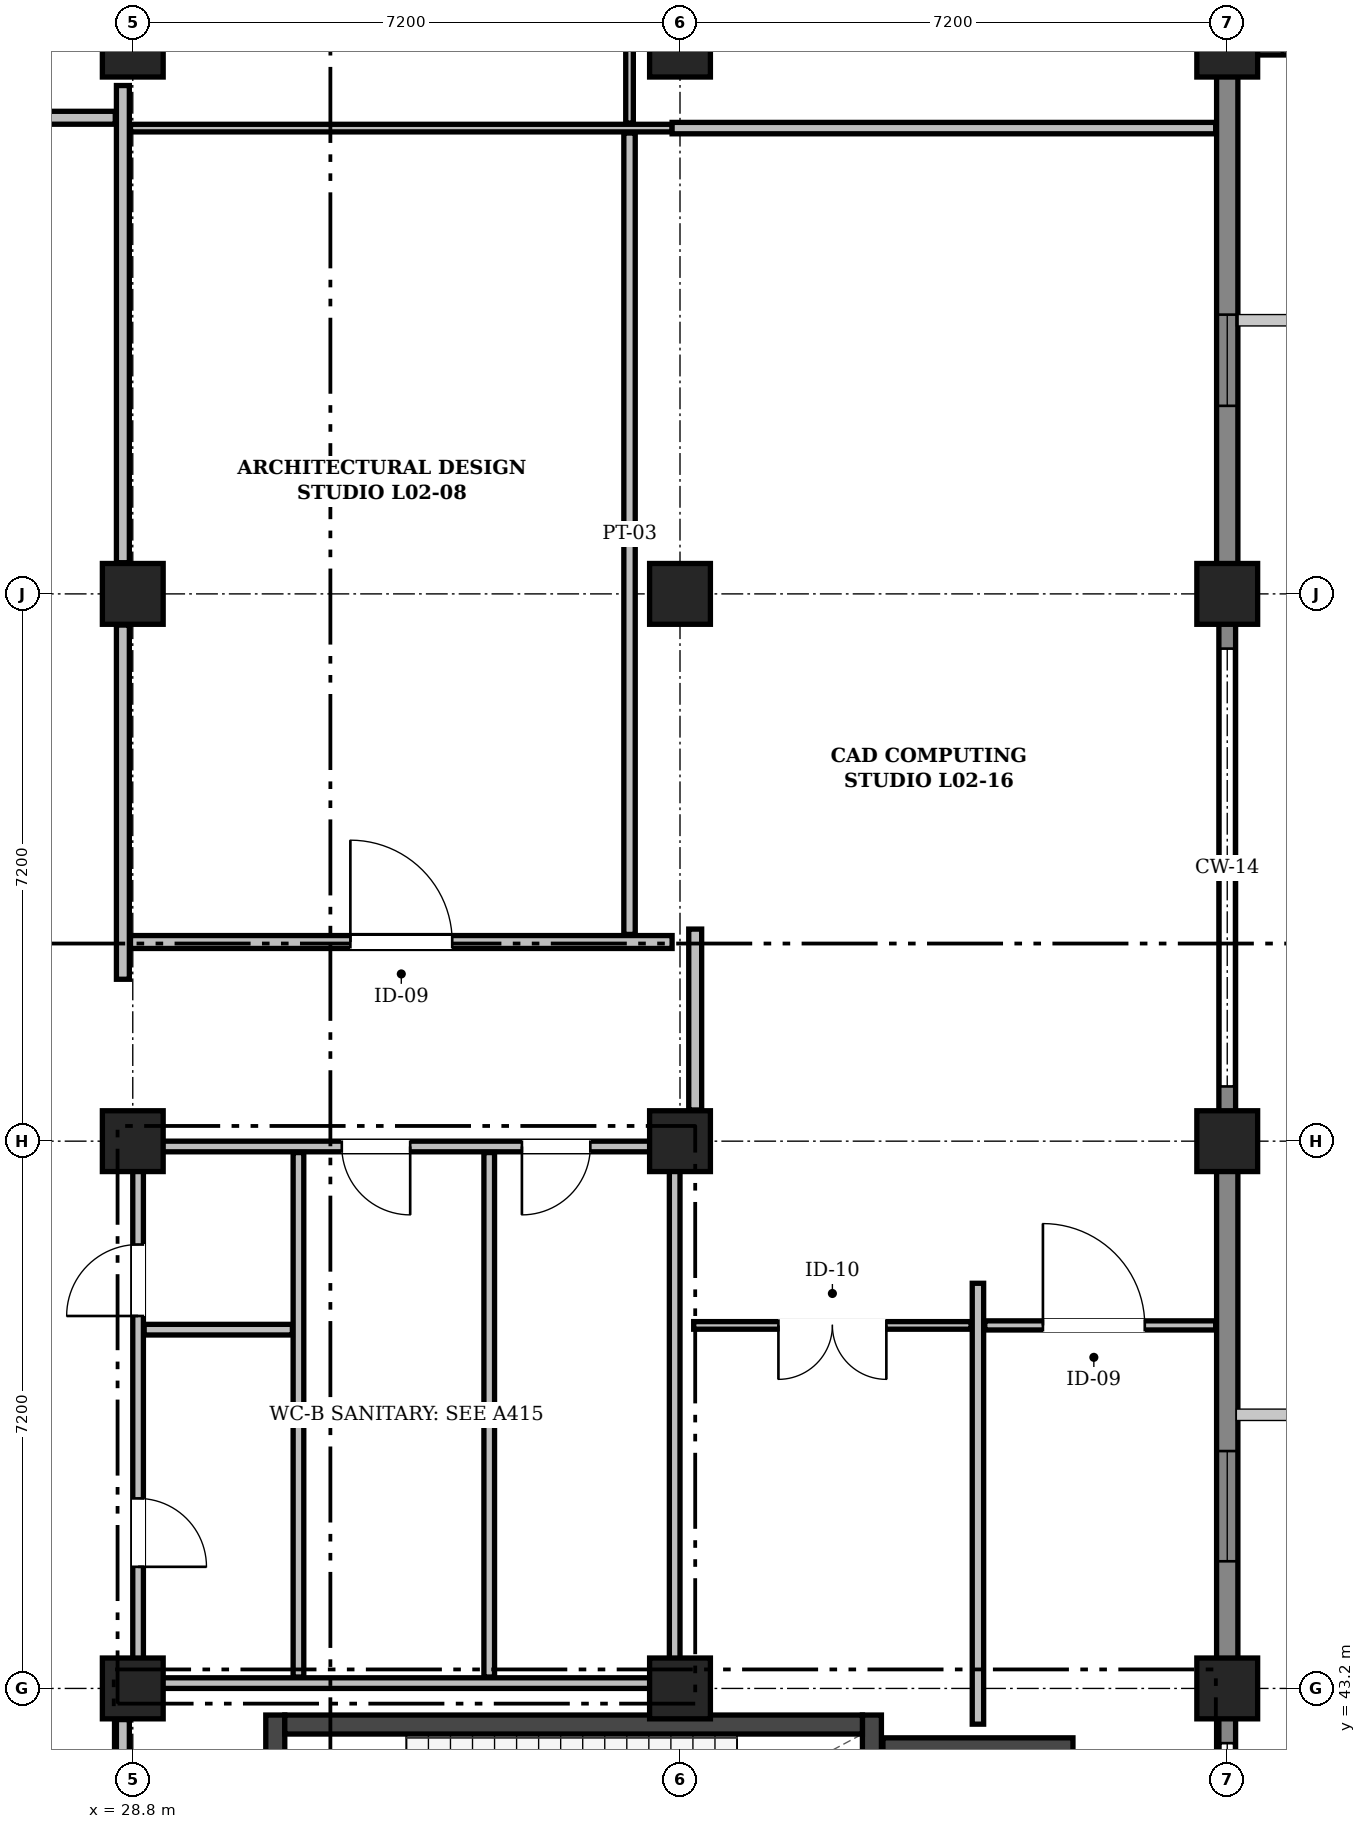
"""IFC4 building model, lengths in metres.
Left out: names, types, materials, properties, quantities, classifications, styles, units other than length and angle.
Written with IfcOpenShell. Run it as: python <this file> out.ifc"""

import sys

from ifc_helpers import new_model, si_unit, direction, frame, frame_2d, origin, origin_2d, place, context, subcontext, project, spatial, rectangle, extrude, element, fill, save


model = new_model("IFC4")
c1 = context("Model", 3, precision=1e-05, world=origin(), true_north=direction((0.0, 1.0)))
c2 = subcontext(c1, "Body", "Model", "MODEL_VIEW")
j1 = project(units=[si_unit("LENGTHUNIT", "METRE"), si_unit("PLANEANGLEUNIT", "RADIAN")], contexts=[c1])
p1 = place(None, origin())
s1 = spatial("IfcSite", under=j1, at=p1, CompositionType="ELEMENT")
p2 = place(p1, origin())
s2 = spatial("IfcBuilding", under=s1, at=p2, CompositionType="ELEMENT")
p3 = place(p2, frame((0.0, 0.0, 9.6)))
s3 = spatial("IfcBuildingStorey", under=s2, at=p3, CompositionType="ELEMENT", Elevation=9.6)
for number, where, z_axis, x_axis in (
    (1, (28.8, 43.2, 0.0), (0.0, 0.0, 1.0), (1.0, 0.0, 0.0)),
    (2, (28.8, 50.4, 0.0), (0.0, 0.0, 1.0), (1.0, 0.0, 0.0)),
    (3, (28.8, 57.6, 0.0), (0.0, 0.0, 1.0), (1.0, 0.0, 0.0)),
    (4, (28.8, 64.8, 0.0), (0.0, 0.0, 1.0), (1.0, 0.0, 0.0)),
    (5, (36.0, 43.2, 0.0), (0.0, 0.0, 1.0), (1.0, 0.0, 0.0)),
    (6, (36.0, 50.4, 0.0), (0.0, 0.0, 1.0), (1.0, 0.0, 0.0)),
    (7, (36.0, 57.6, 0.0), (0.0, 0.0, 1.0), (1.0, 0.0, 0.0)),
    (8, (36.0, 64.8, 0.0), (0.0, 0.0, 1.0), (1.0, 0.0, 0.0)),
    (9, (43.2, 43.2, 0.0), (0.0, 0.0, 1.0), (1.0, 0.0, 0.0)),
    (10, (43.2, 50.4, 0.0), (0.0, 0.0, 1.0), (1.0, 0.0, 0.0)),
    (11, (43.2, 57.6, 0.0), (0.0, 0.0, 1.0), (1.0, 0.0, 0.0)),
    (12, (43.2, 64.8, 0.0), (0.0, 0.0, 1.0), (1.0, 0.0, 0.0)),
):
    element("IfcColumn", number, at=place(p3, frame(where, z_axis=z_axis, x_axis=x_axis)), inside=s3, PredefinedType="COLUMN", context=c2, shape_type="SweptSolid", body=[
        extrude(rectangle(XDim=0.8, YDim=0.8, at=origin_2d()), origin(), (0.0, 0.0, 1.0), 4.8),
    ])
p4 = place(p3, frame((50.4, 64.8, 0.0), z_axis=(0.0, 0.0, 1.0), x_axis=(-1.0, 0.0, 0.0)))
e13 = element("IfcWall", 13, at=p4, inside=s3, PredefinedType="SOLIDWALL", context=c2, shape_type="SweptSolid", body=[
    extrude(rectangle(XDim=7.35, YDim=0.22, at=frame_2d((3.675, 0.0))), origin(), (0.0, 0.0, 1.0), 1.24),
])
p5 = place(p3, frame((43.2, 64.648, 0.0), z_axis=(0.0, 0.0, 1.0), x_axis=(0.0, -1.0, 0.0)))
e14 = element("IfcWall", 14, at=p5, inside=s3, PredefinedType="SOLIDWALL", context=c2, shape_type="SweptSolid", body=[
    extrude(rectangle(XDim=7.048, YDim=0.28, at=frame_2d((3.524, 0.0))), origin(), (0.0, 0.0, 1.0), 4.52),
])
p6 = place(p5, frame((3.374, 0.0, 0.95)))
e15 = element("IfcOpeningElement", 15, at=p6, cuts=e14, PredefinedType="OPENING", context=c2, shape_type="SweptSolid", body=[
    extrude(rectangle(XDim=1.2, YDim=1.8, at=frame_2d((0.6, 0.9))), frame((0.0, 0.152, 0.0), z_axis=(0.0, -1.0, 0.0), x_axis=(1.0, 0.0, 0.0)), (0.0, 0.0, 1.0), 0.304),
])
p7 = place(p3, frame((43.2, 57.6, 0.0), z_axis=(0.0, 0.0, 1.0), x_axis=(0.0, -1.0, 0.0)))
e16 = element("IfcWall", 16, at=p7, inside=s3, PredefinedType="SOLIDWALL", context=c2, shape_type="SweptSolid", body=[
    extrude(rectangle(XDim=7.2, YDim=0.22, at=frame_2d((3.6, 0.0))), origin(), (0.0, 0.0, 1.0), 1.24),
])
p8 = place(p3, frame((43.2, 50.4, 0.0), z_axis=(0.0, 0.0, 1.0), x_axis=(0.0, -1.0, 0.0)))
e17 = element("IfcWall", 17, at=p8, inside=s3, PredefinedType="SOLIDWALL", context=c2, shape_type="SweptSolid", body=[
    extrude(rectangle(XDim=7.2, YDim=0.28, at=frame_2d((3.6, 0.0))), origin(), (0.0, 0.0, 1.0), 4.52),
])
p9 = place(p8, frame((4.077, 0.0, 0.95)))
e18 = element("IfcOpeningElement", 18, at=p9, cuts=e17, PredefinedType="OPENING", context=c2, shape_type="SweptSolid", body=[
    extrude(rectangle(XDim=1.45, YDim=1.8, at=frame_2d((0.725, 0.9))), frame((0.0, 0.152, 0.0), z_axis=(0.0, -1.0, 0.0), x_axis=(1.0, 0.0, 0.0)), (0.0, 0.0, 1.0), 0.304),
])
p10 = place(p3, frame((43.2, 43.2, 0.0), z_axis=(0.0, 0.0, 1.0), x_axis=(0.0, -1.0, 0.0)))
e19 = element("IfcWall", 19, at=p10, inside=s3, PredefinedType="SOLIDWALL", context=c2, shape_type="SweptSolid", body=[
    extrude(rectangle(XDim=7.2, YDim=0.22, at=frame_2d((3.6, 0.0))), origin(), (0.0, 0.0, 1.0), 1.24),
])
p11 = place(p3, frame((38.67, 42.4, 0.0), z_axis=(0.0, 0.0, 1.0), x_axis=(1.0, 0.0, 0.0)))
e20 = element("IfcWall", 20, at=p11, inside=s3, PredefinedType="SHEAR", context=c2, shape_type="SweptSolid", body=[
    extrude(rectangle(XDim=2.5, YDim=0.3, at=frame_2d((1.25, 0.0))), origin(), (0.0, 0.0, 1.0), 4.55),
])
p12 = place(p3, frame((30.675, 39.15, 0.0), z_axis=(0.0, 0.0, 1.0), x_axis=(0.0, 1.0, 0.0)))
e21 = element("IfcWall", 21, at=p12, inside=s3, PredefinedType="SHEAR", context=c2, shape_type="SweptSolid", body=[
    extrude(rectangle(XDim=3.7, YDim=0.25, at=frame_2d((1.85, 0.0))), origin(), (0.0, 0.0, 1.0), 4.55),
])
p13 = place(p12, frame((1.25, 0.0, 0.0)))
e22 = element("IfcOpeningElement", 22, at=p13, cuts=e21, PredefinedType="OPENING", context=c2, shape_type="SweptSolid", body=[
    extrude(rectangle(XDim=1.2, YDim=2.15, at=frame_2d((0.6, 1.075))), frame((0.0, 0.137, 0.0), z_axis=(0.0, -1.0, 0.0), x_axis=(1.0, 0.0, 0.0)), (0.0, 0.0, 1.0), 0.274),
])
p14 = place(p3, frame((38.525, 39.15, 0.0), z_axis=(0.0, 0.0, 1.0), x_axis=(0.0, 1.0, 0.0)))
e23 = element("IfcWall", 23, at=p14, inside=s3, PredefinedType="SHEAR", context=c2, shape_type="SweptSolid", body=[
    extrude(rectangle(XDim=3.7, YDim=0.25, at=frame_2d((1.85, 0.0))), origin(), (0.0, 0.0, 1.0), 4.55),
])
p15 = place(p3, frame((30.8, 42.725, 0.0), z_axis=(0.0, 0.0, 1.0), x_axis=(1.0, 0.0, 0.0)))
e24 = element("IfcWall", 24, at=p15, inside=s3, PredefinedType="SHEAR", context=c2, shape_type="SweptSolid", body=[
    extrude(rectangle(XDim=7.6, YDim=0.25, at=frame_2d((3.8, 0.0))), origin(), (0.0, 0.0, 1.0), 4.55),
])
p16 = place(p3, frame((28.87, 43.27, 0.0), z_axis=(0.0, 0.0, 1.0), x_axis=(1.0, 0.0, 0.0)))
e25 = element("IfcWall", 25, at=p16, inside=s3, PredefinedType="PARTITIONING", context=c2, shape_type="SweptSolid", body=[
    extrude(rectangle(XDim=7.06, YDim=0.14, at=frame_2d((3.53, 0.0))), origin(), (0.0, 0.0, 1.0), 3.93),
])
p17 = place(p3, frame((28.87, 50.33, 0.0), z_axis=(0.0, 0.0, 1.0), x_axis=(1.0, 0.0, 0.0)))
e26 = element("IfcWall", 26, at=p17, inside=s3, PredefinedType="PARTITIONING", context=c2, shape_type="SweptSolid", body=[
    extrude(rectangle(XDim=7.06, YDim=0.14, at=frame_2d((3.53, 0.0))), origin(), (0.0, 0.0, 1.0), 3.93),
])
p18 = place(p17, frame((2.68, 0.0, 0.0)))
e27 = element("IfcOpeningElement", 27, at=p18, cuts=e26, PredefinedType="OPENING", context=c2, shape_type="SweptSolid", body=[
    extrude(rectangle(XDim=0.9, YDim=2.08, at=frame_2d((0.45, 1.04))), frame((0.0, 0.082, 0.0), z_axis=(0.0, -1.0, 0.0), x_axis=(1.0, 0.0, 0.0)), (0.0, 0.0, 1.0), 0.164),
])
p19 = place(p17, frame((5.05, 0.0, 0.0)))
e28 = element("IfcOpeningElement", 28, at=p19, cuts=e26, PredefinedType="OPENING", context=c2, shape_type="SweptSolid", body=[
    extrude(rectangle(XDim=0.9, YDim=2.08, at=frame_2d((0.45, 1.04))), frame((0.0, 0.082, 0.0), z_axis=(0.0, -1.0, 0.0), x_axis=(1.0, 0.0, 0.0)), (0.0, 0.0, 1.0), 0.164),
])
p20 = place(p3, frame((28.87, 43.35, 0.0), z_axis=(0.0, 0.0, 1.0), x_axis=(0.0, 1.0, 0.0)))
e29 = element("IfcWall", 29, at=p20, inside=s3, PredefinedType="PARTITIONING", context=c2, shape_type="SweptSolid", body=[
    extrude(rectangle(XDim=6.9, YDim=0.14, at=frame_2d((3.45, 0.0))), origin(), (0.0, 0.0, 1.0), 4.03),
])
p21 = place(p20, frame((1.45, 0.0, 0.0)))
e30 = element("IfcOpeningElement", 30, at=p21, cuts=e29, PredefinedType="OPENING", context=c2, shape_type="SweptSolid", body=[
    extrude(rectangle(XDim=0.9, YDim=2.08, at=frame_2d((0.45, 1.04))), frame((0.0, 0.082, 0.0), z_axis=(0.0, -1.0, 0.0), x_axis=(1.0, 0.0, 0.0)), (0.0, 0.0, 1.0), 0.164),
])
p22 = place(p20, frame((4.75, 0.0, 0.0)))
e31 = element("IfcOpeningElement", 31, at=p22, cuts=e29, PredefinedType="OPENING", context=c2, shape_type="SweptSolid", body=[
    extrude(rectangle(XDim=0.94, YDim=2.1, at=frame_2d((0.47, 1.05))), frame((0.0, 0.082, 0.0), z_axis=(0.0, -1.0, 0.0), x_axis=(1.0, 0.0, 0.0)), (0.0, 0.0, 1.0), 0.164),
])
p23 = place(p3, frame((35.93, 43.35, 0.0), z_axis=(0.0, 0.0, 1.0), x_axis=(0.0, 1.0, 0.0)))
e32 = element("IfcWall", 32, at=p23, inside=s3, PredefinedType="PARTITIONING", context=c2, shape_type="SweptSolid", body=[
    extrude(rectangle(XDim=6.9, YDim=0.14, at=frame_2d((3.45, 0.0))), origin(), (0.0, 0.0, 1.0), 4.03),
])
for number, where, z_axis, x_axis in (
    (33, (30.98, 43.35, 0.0), (0.0, 0.0, 1.0), (0.0, 1.0, 0.0)),
    (34, (33.49, 43.35, 0.0), (0.0, 0.0, 1.0), (0.0, 1.0, 0.0)),
):
    element("IfcWall", number, at=place(p3, frame(where, z_axis=z_axis, x_axis=x_axis)), inside=s3, PredefinedType="PARTITIONING", context=c2, shape_type="SweptSolid", body=[
        extrude(rectangle(XDim=6.9, YDim=0.14, at=frame_2d((3.45, 0.0))), origin(), (0.0, 0.0, 1.0), 4.46),
    ])
p24 = place(p3, frame((28.95, 47.92, 0.0), z_axis=(0.0, 0.0, 1.0), x_axis=(1.0, 0.0, 0.0)))
e35 = element("IfcWall", 35, at=p24, inside=s3, PredefinedType="PARTITIONING", context=c2, shape_type="SweptSolid", body=[
    extrude(rectangle(XDim=1.95, YDim=0.14, at=frame_2d((0.975, 0.0))), origin(), (0.0, 0.0, 1.0), 4.46),
])
p25 = place(p3, frame((28.67, 36.41, 0.0), z_axis=(0.0, 0.0, 1.0), x_axis=(0.0, 1.0, 0.0)))
e36 = element("IfcWall", 36, at=p25, inside=s3, PredefinedType="PARTITIONING", context=c2, shape_type="SweptSolid", body=[
    extrude(rectangle(XDim=6.38, YDim=0.17, at=frame_2d((3.19, 0.0))), origin(), (0.0, 0.0, 1.0), 4.03),
])
p26 = place(p3, frame((28.67, 58.01, 0.0), z_axis=(0.0, 0.0, 1.0), x_axis=(0.0, 1.0, 0.0)))
e37 = element("IfcWall", 37, at=p26, inside=s3, PredefinedType="PARTITIONING", context=c2, shape_type="SweptSolid", body=[
    extrude(rectangle(XDim=6.278, YDim=0.17, at=frame_2d((3.139, 0.0))), origin(), (0.0, 0.0, 1.0), 4.03),
])
p27 = place(p3, frame((28.67, 52.53, 0.0), z_axis=(0.0, 0.0, 1.0), x_axis=(0.0, 1.0, 0.0)))
e38 = element("IfcWall", 38, at=p27, inside=s3, PredefinedType="PARTITIONING", context=c2, shape_type="SweptSolid", body=[
    extrude(rectangle(XDim=4.66, YDim=0.17, at=frame_2d((2.33, 0.0))), origin(), (0.0, 0.0, 1.0), 4.03),
])
p28 = place(p3, frame((24.83, 63.864, 0.0), z_axis=(0.0, 0.0, 1.0), x_axis=(1.0, 0.0, 0.0)))
e39 = element("IfcWall", 39, at=p28, inside=s3, PredefinedType="PARTITIONING", context=c2, shape_type="SweptSolid", body=[
    extrude(rectangle(XDim=3.74, YDim=0.17, at=frame_2d((1.87, 0.0))), origin(), (0.0, 0.0, 1.0), 4.46),
])
p29 = place(p3, frame((28.77, 53.02, 0.0), z_axis=(0.0, 0.0, 1.0), x_axis=(1.0, 0.0, 0.0)))
e40 = element("IfcWall", 40, at=p29, inside=s3, PredefinedType="PARTITIONING", context=c2, shape_type="SweptSolid", body=[
    extrude(rectangle(XDim=7.126, YDim=0.17, at=frame_2d((3.563, 0.0))), origin(), (0.0, 0.0, 1.0), 4.46),
])
p30 = place(p29, frame((2.893, 0.0, 0.0)))
e41 = element("IfcOpeningElement", 41, at=p30, cuts=e40, PredefinedType="OPENING", context=c2, shape_type="SweptSolid", body=[
    extrude(rectangle(XDim=1.34, YDim=2.24, at=frame_2d((0.67, 1.12))), frame((0.0, 0.097, 0.0), z_axis=(0.0, -1.0, 0.0), x_axis=(1.0, 0.0, 0.0)), (0.0, 0.0, 1.0), 0.194),
])
p31 = place(p3, frame((36.2, 50.81, 0.0), z_axis=(0.0, 0.0, 1.0), x_axis=(0.0, 1.0, 0.0)))
e42 = element("IfcWall", 42, at=p31, inside=s3, PredefinedType="PARTITIONING", context=c2, shape_type="SweptSolid", body=[
    extrude(rectangle(XDim=2.38, YDim=0.17, at=frame_2d((1.19, 0.0))), origin(), (0.0, 0.0, 1.0), 4.03),
])
p32 = place(p3, frame((28.77, 63.728, 0.0), z_axis=(0.0, 0.0, 1.0), x_axis=(1.0, 0.0, 0.0)))
e43 = element("IfcWall", 43, at=p32, inside=s3, PredefinedType="PARTITIONING", context=c2, shape_type="SweptSolid", body=[
    extrude(rectangle(XDim=7.126, YDim=0.1, at=frame_2d((3.563, 0.0))), origin(), (0.0, 0.0, 1.0), 4.46),
])
p33 = place(p3, frame((35.336, 53.12, 0.0), z_axis=(0.0, 0.0, 1.0), x_axis=(0.0, 1.0, 0.0)))
e44 = element("IfcWall", 44, at=p33, inside=s3, PredefinedType="PARTITIONING", context=c2, shape_type="SweptSolid", body=[
    extrude(rectangle(XDim=10.543, YDim=0.15, at=frame_2d((5.271, 0.0))), origin(), (0.0, 0.0, 1.0), 4.46),
])
p34 = place(p3, frame((35.336, 63.793, 0.0), z_axis=(0.0, 0.0, 1.0), x_axis=(0.0, 1.0, 0.0)))
e45 = element("IfcWall", 45, at=p34, inside=s3, PredefinedType="PARTITIONING", context=c2, shape_type="SweptSolid", body=[
    extrude(rectangle(XDim=11.685, YDim=0.1, at=frame_2d((5.843, 0.0))), origin(), (0.0, 0.0, 1.0), 4.46),
])
p35 = place(p3, frame((39.92, 42.73, 0.0), z_axis=(0.0, 0.0, 1.0), x_axis=(0.0, 1.0, 0.0)))
e46 = element("IfcWall", 46, at=p35, inside=s3, PredefinedType="PARTITIONING", context=c2, shape_type="SweptSolid", body=[
    extrude(rectangle(XDim=5.8, YDim=0.15, at=frame_2d((2.9, 0.0))), origin(), (0.0, 0.0, 1.0), 4.46),
])
p36 = place(p3, frame((40.01, 47.976, 0.0), z_axis=(0.0, 0.0, 1.0), x_axis=(1.0, 0.0, 0.0)))
e47 = element("IfcWall", 47, at=p36, inside=s3, PredefinedType="PARTITIONING", context=c2, shape_type="SweptSolid", body=[
    extrude(rectangle(XDim=3.038, YDim=0.12, at=frame_2d((1.519, 0.0))), origin(), (0.0, 0.0, 1.0), 4.46),
])
p37 = place(p36, frame((0.765, 0.0, 0.0)))
e48 = element("IfcOpeningElement", 48, at=p37, cuts=e47, PredefinedType="OPENING", context=c2, shape_type="SweptSolid", body=[
    extrude(rectangle(XDim=1.34, YDim=2.24, at=frame_2d((0.67, 1.12))), frame((0.0, 0.072, 0.0), z_axis=(0.0, -1.0, 0.0), x_axis=(1.0, 0.0, 0.0)), (0.0, 0.0, 1.0), 0.144),
])
p38 = place(p3, frame((36.18, 47.976, 0.0), z_axis=(0.0, 0.0, 1.0), x_axis=(1.0, 0.0, 0.0)))
e49 = element("IfcWall", 49, at=p38, inside=s3, PredefinedType="PARTITIONING", context=c2, shape_type="SweptSolid", body=[
    extrude(rectangle(XDim=3.65, YDim=0.1, at=frame_2d((1.825, 0.0))), origin(), (0.0, 0.0, 1.0), 4.46),
])
p39 = place(p38, frame((1.115, 0.0, 0.0)))
e50 = element("IfcOpeningElement", 50, at=p39, cuts=e49, PredefinedType="OPENING", context=c2, shape_type="SweptSolid", body=[
    extrude(rectangle(XDim=1.42, YDim=2.24, at=frame_2d((0.71, 1.12))), frame((0.0, 0.062, 0.0), z_axis=(0.0, -1.0, 0.0), x_axis=(1.0, 0.0, 0.0)), (0.0, 0.0, 1.0), 0.124),
])
p40 = place(p3, frame((35.896, 63.728, 0.0), z_axis=(0.0, 0.0, 1.0), x_axis=(1.0, 0.0, 0.0)))
e51 = element("IfcWall", 51, at=p40, inside=s3, PredefinedType="PARTITIONING", context=c2, shape_type="SweptSolid", body=[
    extrude(rectangle(XDim=7.152, YDim=0.15, at=frame_2d((3.576, 0.0))), origin(), (0.0, 0.0, 1.0), 4.46),
])
p41 = place(p6, origin())
e52 = element("IfcWindow", 52, at=p41, inside=s3, PartitioningType="SINGLE_PANEL", PredefinedType="WINDOW", context=c2, shape_type="SweptSolid", body=[
    extrude(rectangle(XDim=1.2, YDim=1.8, at=frame_2d((0.6, 0.9))), frame((0.0, 0.03, 0.0), z_axis=(0.0, -1.0, 0.0), x_axis=(1.0, 0.0, 0.0)), (0.0, 0.0, 1.0), 0.06),
])
fill(e15, e52)
p42 = place(p9, origin())
e53 = element("IfcWindow", 53, at=p42, inside=s3, PartitioningType="SINGLE_PANEL", PredefinedType="WINDOW", context=c2, shape_type="SweptSolid", body=[
    extrude(rectangle(XDim=1.45, YDim=1.8, at=frame_2d((0.725, 0.9))), frame((0.0, 0.03, 0.0), z_axis=(0.0, -1.0, 0.0), x_axis=(1.0, 0.0, 0.0)), (0.0, 0.0, 1.0), 0.06),
])
fill(e18, e53)
p43 = place(p21, frame((0.9, 0.0, 0.0), z_axis=(0.0, 0.0, 1.0), x_axis=(-1.0, 0.0, 0.0)))
e54 = element("IfcDoor", 54, at=p43, inside=s3, OperationType="SINGLE_SWING_RIGHT", PredefinedType="DOOR", context=c2, shape_type="SweptSolid", body=[
    extrude(rectangle(XDim=0.9, YDim=2.08, at=frame_2d((0.45, 1.04))), frame((0.0, 0.025, 0.0), z_axis=(0.0, -1.0, 0.0), x_axis=(1.0, 0.0, 0.0)), (0.0, 0.0, 1.0), 0.05),
])
fill(e30, e54)
p44 = place(p22, origin())
e55 = element("IfcDoor", 55, at=p44, inside=s3, OperationType="SINGLE_SWING_LEFT", PredefinedType="DOOR", context=c2, shape_type="SweptSolid", body=[
    extrude(rectangle(XDim=0.94, YDim=2.1, at=frame_2d((0.47, 1.05))), frame((0.0, 0.025, 0.0), z_axis=(0.0, -1.0, 0.0), x_axis=(1.0, 0.0, 0.0)), (0.0, 0.0, 1.0), 0.05),
])
fill(e31, e55)
p45 = place(p18, frame((0.9, 0.0, 0.0), z_axis=(0.0, 0.0, 1.0), x_axis=(-1.0, 0.0, 0.0)))
e56 = element("IfcDoor", 56, at=p45, inside=s3, OperationType="SINGLE_SWING_LEFT", PredefinedType="DOOR", context=c2, shape_type="SweptSolid", body=[
    extrude(rectangle(XDim=0.9, YDim=2.08, at=frame_2d((0.45, 1.04))), frame((0.0, 0.025, 0.0), z_axis=(0.0, -1.0, 0.0), x_axis=(1.0, 0.0, 0.0)), (0.0, 0.0, 1.0), 0.05),
])
fill(e27, e56)
p46 = place(p19, frame((0.9, 0.0, 0.0), z_axis=(0.0, 0.0, 1.0), x_axis=(-1.0, 0.0, 0.0)))
e57 = element("IfcDoor", 57, at=p46, inside=s3, OperationType="SINGLE_SWING_RIGHT", PredefinedType="DOOR", context=c2, shape_type="SweptSolid", body=[
    extrude(rectangle(XDim=0.9, YDim=2.08, at=frame_2d((0.45, 1.04))), frame((0.0, 0.025, 0.0), z_axis=(0.0, -1.0, 0.0), x_axis=(1.0, 0.0, 0.0)), (0.0, 0.0, 1.0), 0.05),
])
fill(e28, e57)
p47 = place(p30, origin())
e58 = element("IfcDoor", 58, at=p47, inside=s3, OperationType="SINGLE_SWING_LEFT", PredefinedType="DOOR", context=c2, shape_type="SweptSolid", body=[
    extrude(rectangle(XDim=1.34, YDim=2.24, at=frame_2d((0.67, 1.12))), frame((0.0, 0.025, 0.0), z_axis=(0.0, -1.0, 0.0), x_axis=(1.0, 0.0, 0.0)), (0.0, 0.0, 1.0), 0.05),
])
fill(e41, e58)
p48 = place(p37, origin())
e59 = element("IfcDoor", 59, at=p48, inside=s3, OperationType="SINGLE_SWING_LEFT", PredefinedType="DOOR", context=c2, shape_type="SweptSolid", body=[
    extrude(rectangle(XDim=1.34, YDim=2.24, at=frame_2d((0.67, 1.12))), frame((0.0, 0.025, 0.0), z_axis=(0.0, -1.0, 0.0), x_axis=(1.0, 0.0, 0.0)), (0.0, 0.0, 1.0), 0.05),
])
fill(e48, e59)
p49 = place(p39, frame((1.42, 0.0, 0.0), z_axis=(0.0, 0.0, 1.0), x_axis=(-1.0, 0.0, 0.0)))
e60 = element("IfcDoor", 60, at=p49, inside=s3, OperationType="DOUBLE_DOOR_SINGLE_SWING", PredefinedType="DOOR", context=c2, shape_type="SweptSolid", body=[
    extrude(rectangle(XDim=1.42, YDim=2.24, at=frame_2d((0.71, 1.12))), frame((0.0, 0.025, 0.0), z_axis=(0.0, -1.0, 0.0), x_axis=(1.0, 0.0, 0.0)), (0.0, 0.0, 1.0), 0.05),
])
fill(e50, e60)
save(model, sys.argv[1])
